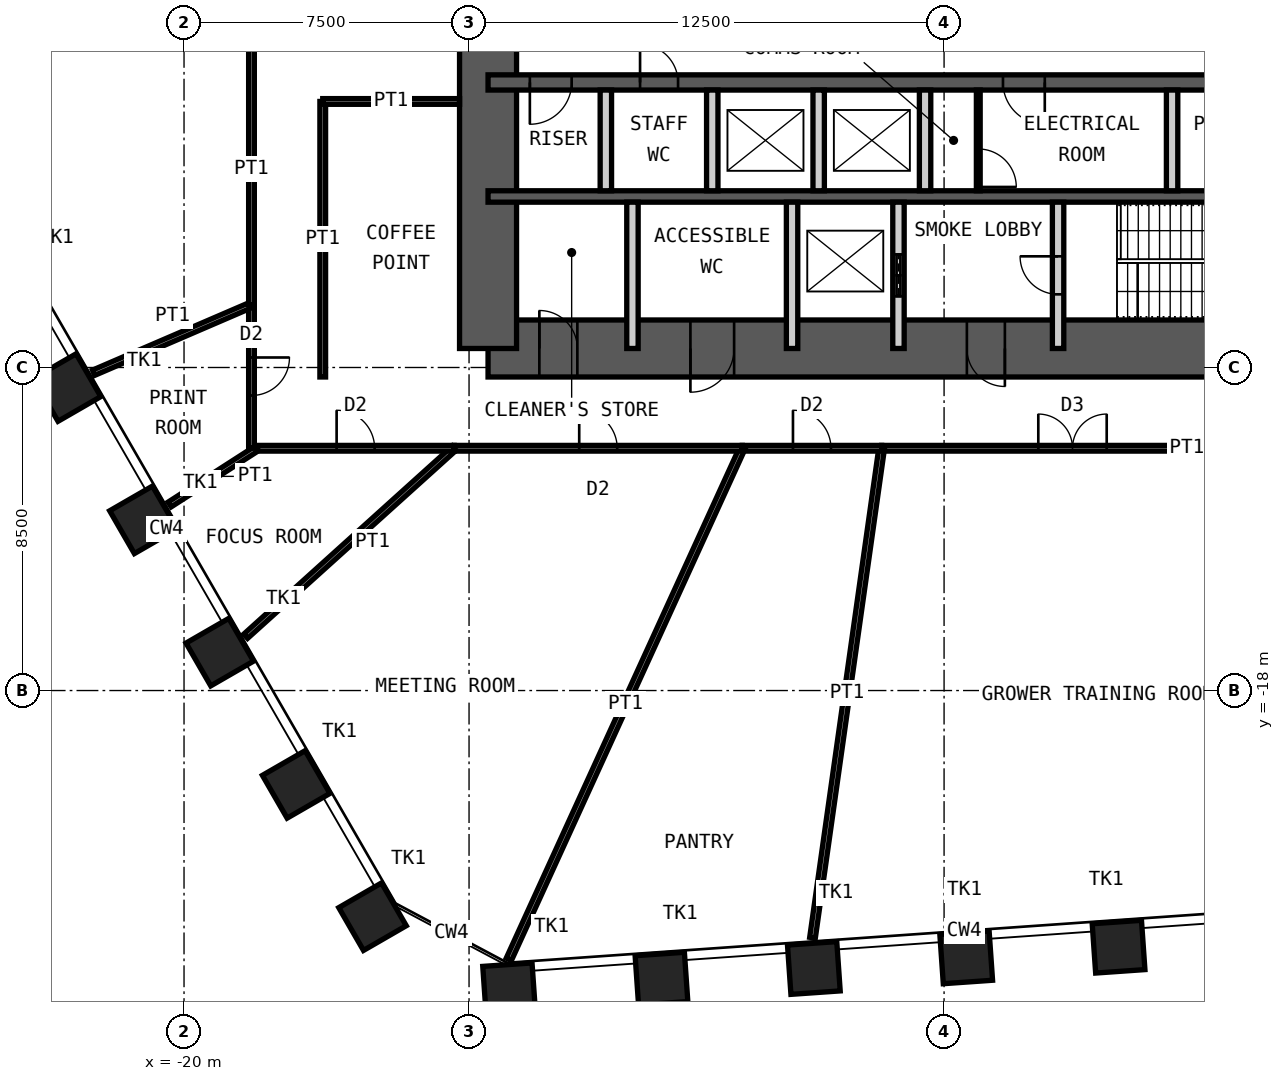
"""IFC4 building model, lengths in metres.
Left out: names, types, materials, properties, quantities, classifications, styles, units other than length and angle.
Written with IfcOpenShell. Run it as: python <this file> out.ifc"""

import sys

from ifc_helpers import new_model, si_unit, direction, frame, frame_2d, origin, origin_2d, place, context, subcontext, project, spatial, rectangle, hollow_rectangle, extrude, element, fill, save


model = new_model("IFC4")
c1 = context("Model", 3, precision=1e-05, world=origin(), true_north=direction((0.0, 1.0)))
c2 = subcontext(c1, "Body", "Model", "MODEL_VIEW")
j1 = project(units=[si_unit("LENGTHUNIT", "METRE"), si_unit("PLANEANGLEUNIT", "RADIAN")], contexts=[c1])
p1 = place(None, origin())
s1 = spatial("IfcSite", under=j1, at=p1, CompositionType="ELEMENT")
p2 = place(p1, origin())
s2 = spatial("IfcBuilding", under=s1, at=p2, CompositionType="ELEMENT")
p3 = place(p2, frame((0.0, 0.0, 170.2)))
s3 = spatial("IfcBuildingStorey", under=s2, at=p3, CompositionType="ELEMENT", Elevation=170.2)
for number, where, z_axis, x_axis in (
    (1, (4.592, -24.74, 0.0), (0.0, 0.0, 1.0), (0.998, 0.07, 0.0)),
    (2, (0.582, -25.02, 0.0), (0.0, 0.0, 1.0), (0.998, 0.07, 0.0)),
    (3, (-3.427, -25.301, 0.0), (0.0, 0.0, 1.0), (0.998, 0.07, 0.0)),
    (4, (-7.436, -25.581, 0.0), (0.0, 0.0, 1.0), (0.998, 0.07, 0.0)),
    (5, (-11.446, -25.861, 0.0), (0.0, 0.0, 1.0), (0.998, 0.07, 0.0)),
    (6, (-15.04, -23.95, 0.0), (0.0, 0.0, 1.0), (0.5, -0.866, 0.0)),
    (7, (-17.049, -20.47, 0.0), (0.0, 0.0, 1.0), (0.5, -0.866, 0.0)),
    (8, (-19.059, -16.989, 0.0), (0.0, 0.0, 1.0), (0.5, -0.866, 0.0)),
    (9, (-21.068, -13.509, 0.0), (0.0, 0.0, 1.0), (0.5, -0.866, 0.0)),
    (10, (-23.078, -10.028, 0.0), (0.0, 0.0, 1.0), (0.5, -0.866, 0.0)),
):
    element("IfcColumn", number, at=place(p3, frame(where, z_axis=z_axis, x_axis=x_axis)), inside=s3, PredefinedType="COLUMN", context=c2, shape_type="SweptSolid", body=[
        extrude(hollow_rectangle(XDim=1.3, YDim=1.3, WallThickness=0.1, at=origin_2d()), origin(), (0.0, 0.0, 1.0), 4.2),
    ])
p4 = place(p3, frame((-12.0, -9.0, 0.0), z_axis=(0.0, 0.0, 1.0), x_axis=(1.0, 0.0, 0.0)))
e11 = element("IfcWall", 11, at=p4, inside=s3, PredefinedType="SHEAR", context=c2, shape_type="SweptSolid", body=[
    extrude(rectangle(XDim=24.0, YDim=1.5, at=frame_2d((12.0, 0.0))), origin(), (0.0, 0.0, 1.0), 4.2),
])
p5 = place(p4, frame((1.35, 0.0, 0.0)))
e12 = element("IfcOpeningElement", 12, at=p5, cuts=e11, PredefinedType="OPENING", context=c2, shape_type="SweptSolid", body=[
    extrude(rectangle(XDim=1.0, YDim=2.1, at=frame_2d((0.5, 1.05))), frame((0.0, 0.76, 0.0), z_axis=(0.0, -1.0, 0.0), x_axis=(1.0, 0.0, 0.0)), (0.0, 0.0, 1.0), 1.52),
])
p6 = place(p4, frame((5.325, 0.0, 0.0)))
e13 = element("IfcOpeningElement", 13, at=p6, cuts=e11, PredefinedType="OPENING", context=c2, shape_type="SweptSolid", body=[
    extrude(rectangle(XDim=1.15, YDim=2.1, at=frame_2d((0.575, 1.05))), frame((0.0, 0.76, 0.0), z_axis=(0.0, -1.0, 0.0), x_axis=(1.0, 0.0, 0.0)), (0.0, 0.0, 1.0), 1.52),
])
p7 = place(p4, frame((12.6, 0.0, 0.0)))
e14 = element("IfcOpeningElement", 14, at=p7, cuts=e11, PredefinedType="OPENING", context=c2, shape_type="SweptSolid", body=[
    extrude(rectangle(XDim=1.0, YDim=2.1, at=frame_2d((0.5, 1.05))), frame((0.0, 0.76, 0.0), z_axis=(0.0, -1.0, 0.0), x_axis=(1.0, 0.0, 0.0)), (0.0, 0.0, 1.0), 1.52),
])
p8 = place(p3, frame((-12.0, -9.0, 0.0), z_axis=(0.0, 0.0, 1.0), x_axis=(0.0, 1.0, 0.0)))
e15 = element("IfcWall", 15, at=p8, inside=s3, PredefinedType="SHEAR", context=c2, shape_type="SweptSolid", body=[
    extrude(rectangle(XDim=18.0, YDim=1.5, at=frame_2d((9.0, 0.0))), origin(), (0.0, 0.0, 1.0), 4.2),
])
p9 = place(p8, frame((8.1, 0.0, 0.0)))
e16 = element("IfcOpeningElement", 16, at=p9, cuts=e15, PredefinedType="OPENING", context=c2, shape_type="SweptSolid", body=[
    extrude(rectangle(XDim=1.8, YDim=2.1, at=frame_2d((0.9, 1.05))), frame((0.0, 0.76, 0.0), z_axis=(0.0, -1.0, 0.0), x_axis=(1.0, 0.0, 0.0)), (0.0, 0.0, 1.0), 1.52),
])
p10 = place(p3, frame((-12.0, -2.0, 0.0), z_axis=(0.0, 0.0, 1.0), x_axis=(1.0, 0.0, 0.0)))
e17 = element("IfcWall", 17, at=p10, inside=s3, PredefinedType="SHEAR", context=c2, shape_type="SweptSolid", body=[
    extrude(rectangle(XDim=24.0, YDim=0.4, at=frame_2d((12.0, 0.0))), origin(), (0.0, 0.0, 1.0), 4.2),
])
p11 = place(p10, frame((1.1, 0.0, 0.0)))
e18 = element("IfcOpeningElement", 18, at=p11, cuts=e17, PredefinedType="OPENING", context=c2, shape_type="SweptSolid", body=[
    extrude(rectangle(XDim=1.1, YDim=2.1, at=frame_2d((0.55, 1.05))), frame((0.0, 0.21, 0.0), z_axis=(0.0, -1.0, 0.0), x_axis=(1.0, 0.0, 0.0)), (0.0, 0.0, 1.0), 0.42),
])
p12 = place(p10, frame((13.55, 0.0, 0.0)))
e19 = element("IfcOpeningElement", 19, at=p12, cuts=e17, PredefinedType="OPENING", context=c2, shape_type="SweptSolid", body=[
    extrude(rectangle(XDim=1.1, YDim=2.1, at=frame_2d((0.55, 1.05))), frame((0.0, 0.21, 0.0), z_axis=(0.0, -1.0, 0.0), x_axis=(1.0, 0.0, 0.0)), (0.0, 0.0, 1.0), 0.42),
])
p13 = place(p10, frame((20.7, 0.0, 0.0)))
e20 = element("IfcOpeningElement", 20, at=p13, cuts=e17, PredefinedType="OPENING", context=c2, shape_type="SweptSolid", body=[
    extrude(rectangle(XDim=1.1, YDim=2.1, at=frame_2d((0.55, 1.05))), frame((0.0, 0.21, 0.0), z_axis=(0.0, -1.0, 0.0), x_axis=(1.0, 0.0, 0.0)), (0.0, 0.0, 1.0), 0.42),
])
p14 = place(p10, frame((4.0, 0.0, 0.0)))
e21 = element("IfcOpeningElement", 21, at=p14, cuts=e17, PredefinedType="OPENING", context=c2, shape_type="SweptSolid", body=[
    extrude(rectangle(XDim=1.0, YDim=2.1, at=frame_2d((0.5, 1.05))), frame((0.0, 0.21, 0.0), z_axis=(0.0, -1.0, 0.0), x_axis=(1.0, 0.0, 0.0)), (0.0, 0.0, 1.0), 0.42),
])
p15 = place(p3, frame((-12.0, -5.0, 0.0), z_axis=(0.0, 0.0, 1.0), x_axis=(1.0, 0.0, 0.0)))
e22 = element("IfcWall", 22, at=p15, inside=s3, PredefinedType="SHEAR", context=c2, shape_type="SweptSolid", body=[
    extrude(rectangle(XDim=24.0, YDim=0.3, at=frame_2d((12.0, 0.0))), origin(), (0.0, 0.0, 1.0), 4.2),
])
for number, where, z_axis, x_axis in (
    (23, (-8.9, -4.85, 0.0), (0.0, 0.0, 1.0), (0.0, 1.0, 0.0)),
    (24, (-6.1, -4.85, 0.0), (0.0, 0.0, 1.0), (0.0, 1.0, 0.0)),
    (25, (-3.3, -4.85, 0.0), (0.0, 0.0, 1.0), (0.0, 1.0, 0.0)),
    (26, (-0.5, -4.85, 0.0), (0.0, 0.0, 1.0), (0.0, 1.0, 0.0)),
    (27, (6.0, -4.85, 0.0), (0.0, 0.0, 1.0), (0.0, 1.0, 0.0)),
):
    element("IfcWall", number, at=place(p3, frame(where, z_axis=z_axis, x_axis=x_axis)), inside=s3, PredefinedType="PARTITIONING", context=c2, shape_type="SweptSolid", body=[
        extrude(rectangle(XDim=2.65, YDim=0.3, at=frame_2d((1.325, 0.0))), origin(), (0.0, 0.0, 1.0), 3.98),
    ])
for number, where, z_axis, x_axis in (
    (28, (-8.2, -9.0, 0.0), (0.0, 0.0, 1.0), (0.0, 1.0, 0.0)),
    (29, (-4.0, -9.0, 0.0), (0.0, 0.0, 1.0), (0.0, 1.0, 0.0)),
):
    element("IfcWall", number, at=place(p3, frame(where, z_axis=z_axis, x_axis=x_axis)), inside=s3, PredefinedType="PARTITIONING", context=c2, shape_type="SweptSolid", body=[
        extrude(rectangle(XDim=3.85, YDim=0.3, at=frame_2d((1.925, 0.0))), origin(), (0.0, 0.0, 1.0), 3.98),
    ])
p16 = place(p3, frame((-1.2, -9.0, 0.0), z_axis=(0.0, 0.0, 1.0), x_axis=(0.0, 1.0, 0.0)))
e30 = element("IfcWall", 30, at=p16, inside=s3, PredefinedType="PARTITIONING", context=c2, shape_type="SweptSolid", body=[
    extrude(rectangle(XDim=3.85, YDim=0.3, at=frame_2d((1.925, 0.0))), origin(), (0.0, 0.0, 1.0), 3.98),
])
p17 = place(p16, frame((1.375, 0.0, 0.0)))
e31 = element("IfcOpeningElement", 31, at=p17, cuts=e30, PredefinedType="OPENING", context=c2, shape_type="SweptSolid", body=[
    extrude(rectangle(XDim=1.1, YDim=2.4, at=frame_2d((0.55, 1.2))), frame((0.0, 0.16, 0.0), z_axis=(0.0, -1.0, 0.0), x_axis=(1.0, 0.0, 0.0)), (0.0, 0.0, 1.0), 0.32),
])
p18 = place(p3, frame((3.0, -9.0, 0.0), z_axis=(0.0, 0.0, 1.0), x_axis=(0.0, 1.0, 0.0)))
e32 = element("IfcWall", 32, at=p18, inside=s3, PredefinedType="PARTITIONING", context=c2, shape_type="SweptSolid", body=[
    extrude(rectangle(XDim=3.85, YDim=0.3, at=frame_2d((1.925, 0.0))), origin(), (0.0, 0.0, 1.0), 3.98),
])
p19 = place(p18, frame((1.425, 0.0, 0.0)))
e33 = element("IfcOpeningElement", 33, at=p19, cuts=e32, PredefinedType="OPENING", context=c2, shape_type="SweptSolid", body=[
    extrude(rectangle(XDim=1.0, YDim=2.1, at=frame_2d((0.5, 1.05))), frame((0.0, 0.16, 0.0), z_axis=(0.0, -1.0, 0.0), x_axis=(1.0, 0.0, 0.0)), (0.0, 0.0, 1.0), 0.32),
])
p20 = place(p3, frame((0.9, -4.85, 0.0), z_axis=(0.0, 0.0, 1.0), x_axis=(0.0, 1.0, 0.0)))
e34 = element("IfcWall", 34, at=p20, inside=s3, PredefinedType="PARTITIONING", context=c2, shape_type="SweptSolid", body=[
    extrude(rectangle(XDim=2.65, YDim=0.1, at=frame_2d((1.325, 0.0))), origin(), (0.0, 0.0, 1.0), 3.98),
])
p21 = place(p20, frame((0.1, 0.0, 0.0)))
e35 = element("IfcOpeningElement", 35, at=p21, cuts=e34, PredefinedType="OPENING", context=c2, shape_type="SweptSolid", body=[
    extrude(rectangle(XDim=1.0, YDim=2.4, at=frame_2d((0.5, 1.2))), frame((0.0, 0.06, 0.0), z_axis=(0.0, -1.0, 0.0), x_axis=(1.0, 0.0, 0.0)), (0.0, 0.0, 1.0), 0.12),
])
p22 = place(p3, frame((8.401, -11.625, 0.0), z_axis=(0.0, 0.0, 1.0), x_axis=(-1.0, 0.0, 0.0)))
e36 = element("IfcWall", 36, at=p22, inside=s3, PredefinedType="PARTITIONING", context=c2, shape_type="SweptSolid", body=[
    extrude(rectangle(XDim=10.044, YDim=0.15, at=frame_2d((5.022, 0.0))), origin(), (0.0, 0.0, 1.0), 3.92),
])
p23 = place(p22, frame((4.122, 0.0, 0.0)))
e37 = element("IfcOpeningElement", 37, at=p23, cuts=e36, PredefinedType="OPENING", context=c2, shape_type="SweptSolid", body=[
    extrude(rectangle(XDim=1.8, YDim=2.4, at=frame_2d((0.9, 1.2))), frame((0.0, 0.085, 0.0), z_axis=(0.0, -1.0, 0.0), x_axis=(1.0, 0.0, 0.0)), (0.0, 0.0, 1.0), 0.17),
])
p24 = place(p3, frame((-3.462, -24.503, 0.0), z_axis=(0.0, 0.0, 1.0), x_axis=(0.139899618934, 0.990165691499, 0.0)))
e38 = element("IfcWall", 38, at=p24, inside=s3, PredefinedType="PARTITIONING", context=c2, shape_type="SweptSolid", body=[
    extrude(rectangle(XDim=13.006, YDim=0.15, at=frame_2d((6.503, 0.0))), origin(), (0.0, 0.0, 1.0), 2.72),
])
p25 = place(p3, frame((-1.642, -11.625, 0.0), z_axis=(0.0, 0.0, 1.0), x_axis=(-1.0, 0.0, 0.0)))
e39 = element("IfcWall", 39, at=p25, inside=s3, PredefinedType="PARTITIONING", context=c2, shape_type="SweptSolid", body=[
    extrude(rectangle(XDim=3.668, YDim=0.15, at=frame_2d((1.834, 0.0))), origin(), (0.0, 0.0, 1.0), 3.92),
])
p26 = place(p25, frame((1.334, 0.0, 0.0)))
e40 = element("IfcOpeningElement", 40, at=p26, cuts=e39, PredefinedType="OPENING", context=c2, shape_type="SweptSolid", body=[
    extrude(rectangle(XDim=1.0, YDim=2.4, at=frame_2d((0.5, 1.2))), frame((0.0, 0.085, 0.0), z_axis=(0.0, -1.0, 0.0), x_axis=(1.0, 0.0, 0.0)), (0.0, 0.0, 1.0), 0.17),
])
p27 = place(p3, frame((-11.453, -25.072, 0.0), z_axis=(0.0, 0.0, 1.0), x_axis=(0.415494357555, 0.909595755729, 0.0)))
e41 = element("IfcWall", 41, at=p27, inside=s3, PredefinedType="PARTITIONING", context=c2, shape_type="SweptSolid", body=[
    extrude(rectangle(XDim=14.784, YDim=0.15, at=frame_2d((7.392, 0.0))), origin(), (0.0, 0.0, 1.0), 2.72),
])
p28 = place(p3, frame((-5.31, -11.625, 0.0), z_axis=(0.0, 0.0, 1.0), x_axis=(-1.0, 0.0, 0.0)))
e42 = element("IfcWall", 42, at=p28, inside=s3, PredefinedType="PARTITIONING", context=c2, shape_type="SweptSolid", body=[
    extrude(rectangle(XDim=7.582, YDim=0.15, at=frame_2d((3.791, 0.0))), origin(), (0.0, 0.0, 1.0), 3.92),
])
p29 = place(p28, frame((3.291, 0.0, 0.0)))
e43 = element("IfcOpeningElement", 43, at=p29, cuts=e42, PredefinedType="OPENING", context=c2, shape_type="SweptSolid", body=[
    extrude(rectangle(XDim=1.0, YDim=2.4, at=frame_2d((0.5, 1.2))), frame((0.0, 0.085, 0.0), z_axis=(0.0, -1.0, 0.0), x_axis=(1.0, 0.0, 0.0)), (0.0, 0.0, 1.0), 0.17),
])
p30 = place(p3, frame((-18.378, -16.572, 0.0), z_axis=(0.0, 0.0, 1.0), x_axis=(0.742666079924, 0.669661924951, 0.0)))
e44 = element("IfcWall", 44, at=p30, inside=s3, PredefinedType="PARTITIONING", context=c2, shape_type="SweptSolid", body=[
    extrude(rectangle(XDim=7.387, YDim=0.15, at=frame_2d((3.694, 0.0))), origin(), (0.0, 0.0, 1.0), 2.72),
])
p31 = place(p3, frame((-12.892, -11.625, 0.0), z_axis=(0.0, 0.0, 1.0), x_axis=(-1.0, 0.0, 0.0)))
e45 = element("IfcWall", 45, at=p31, inside=s3, PredefinedType="PARTITIONING", context=c2, shape_type="SweptSolid", body=[
    extrude(rectangle(XDim=5.185, YDim=0.15, at=frame_2d((2.593, 0.0))), origin(), (0.0, 0.0, 1.0), 3.92),
])
p32 = place(p31, frame((2.093, 0.0, 0.0)))
e46 = element("IfcOpeningElement", 46, at=p32, cuts=e45, PredefinedType="OPENING", context=c2, shape_type="SweptSolid", body=[
    extrude(rectangle(XDim=1.0, YDim=2.4, at=frame_2d((0.5, 1.2))), frame((0.0, 0.085, 0.0), z_axis=(0.0, -1.0, 0.0), x_axis=(1.0, 0.0, 0.0)), (0.0, 0.0, 1.0), 0.17),
])
p33 = place(p3, frame((-20.378, -13.104, 0.0), z_axis=(0.0, 0.0, 1.0), x_axis=(0.841108871346, 0.540865848934, 0.0)))
e47 = element("IfcWall", 47, at=p33, inside=s3, PredefinedType="PARTITIONING", context=c2, shape_type="SweptSolid", body=[
    extrude(rectangle(XDim=2.735, YDim=0.15, at=frame_2d((1.368, 0.0))), origin(), (0.0, 0.0, 1.0), 2.72),
])
p34 = place(p3, frame((-18.225, -11.625, 0.0), z_axis=(0.0, 0.0, 1.0), x_axis=(0.0, 1.0, 0.0)))
e48 = element("IfcWall", 48, at=p34, inside=s3, PredefinedType="PARTITIONING", context=c2, shape_type="SweptSolid", body=[
    extrude(rectangle(XDim=3.776, YDim=0.15, at=frame_2d((1.888, 0.0))), origin(), (0.0, 0.0, 1.0), 3.92),
])
p35 = place(p34, frame((1.388, 0.0, 0.0)))
e49 = element("IfcOpeningElement", 49, at=p35, cuts=e48, PredefinedType="OPENING", context=c2, shape_type="SweptSolid", body=[
    extrude(rectangle(XDim=1.0, YDim=2.4, at=frame_2d((0.5, 1.2))), frame((0.0, 0.085, 0.0), z_axis=(0.0, -1.0, 0.0), x_axis=(1.0, 0.0, 0.0)), (0.0, 0.0, 1.0), 0.17),
])
p36 = place(p3, frame((-22.38, -9.638, 0.0), z_axis=(0.0, 0.0, 1.0), x_axis=(0.918428905659, 0.395586078181, 0.0)))
e50 = element("IfcWall", 50, at=p36, inside=s3, PredefinedType="PARTITIONING", context=c2, shape_type="SweptSolid", body=[
    extrude(rectangle(XDim=4.524, YDim=0.15, at=frame_2d((2.262, 0.0))), origin(), (0.0, 0.0, 1.0), 2.72),
])
p37 = place(p3, frame((-18.225, -7.849, 0.0), z_axis=(0.0, 0.0, 1.0), x_axis=(0.0, 1.0, 0.0)))
e51 = element("IfcWall", 51, at=p37, inside=s3, PredefinedType="PARTITIONING", context=c2, shape_type="SweptSolid", body=[
    extrude(rectangle(XDim=17.845, YDim=0.15, at=frame_2d((8.922, 0.0))), origin(), (0.0, 0.0, 1.0), 3.92),
])
p38 = place(p37, frame((8.022, 0.0, 0.0)))
e52 = element("IfcOpeningElement", 52, at=p38, cuts=e51, PredefinedType="OPENING", context=c2, shape_type="SweptSolid", body=[
    extrude(rectangle(XDim=1.8, YDim=2.4, at=frame_2d((0.9, 1.2))), frame((0.0, 0.085, 0.0), z_axis=(0.0, -1.0, 0.0), x_axis=(1.0, 0.0, 0.0)), (0.0, 0.0, 1.0), 0.17),
])
p39 = place(p3, frame((-16.35, -9.75, 0.0), z_axis=(0.0, 0.0, 1.0), x_axis=(0.0, 1.0, 0.0)))
e53 = element("IfcWall", 53, at=p39, inside=s3, PredefinedType="PARTITIONING", context=c2, shape_type="SweptSolid", body=[
    extrude(rectangle(XDim=7.25, YDim=0.15, at=frame_2d((3.625, 0.0))), origin(), (0.0, 0.0, 1.0), 3.92),
])
p40 = place(p3, frame((-12.75, -2.5, 0.0), z_axis=(0.0, 0.0, 1.0), x_axis=(-1.0, 0.0, 0.0)))
e54 = element("IfcWall", 54, at=p40, inside=s3, PredefinedType="PARTITIONING", context=c2, shape_type="SweptSolid", body=[
    extrude(rectangle(XDim=3.6, YDim=0.15, at=frame_2d((1.8, 0.0))), origin(), (0.0, 0.0, 1.0), 3.12),
])
p41 = place(p5, origin())
e55 = element("IfcDoor", 55, at=p41, inside=s3, OperationType="SINGLE_SWING_RIGHT", PredefinedType="DOOR", context=c2, shape_type="SweptSolid", body=[
    extrude(rectangle(XDim=1.0, YDim=2.1, at=frame_2d((0.5, 1.05))), frame((0.0, 0.025, 0.0), z_axis=(0.0, -1.0, 0.0), x_axis=(1.0, 0.0, 0.0)), (0.0, 0.0, 1.0), 0.05),
])
fill(e12, e55)
p42 = place(p6, origin())
e56 = element("IfcDoor", 56, at=p42, inside=s3, OperationType="SINGLE_SWING_LEFT", PredefinedType="DOOR", context=c2, shape_type="SweptSolid", body=[
    extrude(rectangle(XDim=1.15, YDim=2.1, at=frame_2d((0.575, 1.05))), frame((0.0, 0.025, 0.0), z_axis=(0.0, -1.0, 0.0), x_axis=(1.0, 0.0, 0.0)), (0.0, 0.0, 1.0), 0.05),
])
fill(e13, e56)
p43 = place(p7, origin())
e57 = element("IfcDoor", 57, at=p43, inside=s3, OperationType="SINGLE_SWING_RIGHT", PredefinedType="DOOR", context=c2, shape_type="SweptSolid", body=[
    extrude(rectangle(XDim=1.0, YDim=2.1, at=frame_2d((0.5, 1.05))), frame((0.0, 0.025, 0.0), z_axis=(0.0, -1.0, 0.0), x_axis=(1.0, 0.0, 0.0)), (0.0, 0.0, 1.0), 0.05),
])
fill(e14, e57)
p44 = place(p19, origin())
e58 = element("IfcDoor", 58, at=p44, inside=s3, OperationType="SINGLE_SWING_LEFT", PredefinedType="DOOR", context=c2, shape_type="SweptSolid", body=[
    extrude(rectangle(XDim=1.0, YDim=2.1, at=frame_2d((0.5, 1.05))), frame((0.0, 0.025, 0.0), z_axis=(0.0, -1.0, 0.0), x_axis=(1.0, 0.0, 0.0)), (0.0, 0.0, 1.0), 0.05),
])
fill(e33, e58)
p45 = place(p11, origin())
e59 = element("IfcDoor", 59, at=p45, inside=s3, OperationType="SINGLE_SWING_LEFT", PredefinedType="DOOR", context=c2, shape_type="SweptSolid", body=[
    extrude(rectangle(XDim=1.1, YDim=2.1, at=frame_2d((0.55, 1.05))), frame((0.0, 0.025, 0.0), z_axis=(0.0, -1.0, 0.0), x_axis=(1.0, 0.0, 0.0)), (0.0, 0.0, 1.0), 0.05),
])
fill(e18, e59)
p46 = place(p12, origin())
e60 = element("IfcDoor", 60, at=p46, inside=s3, OperationType="SINGLE_SWING_RIGHT", PredefinedType="DOOR", context=c2, shape_type="SweptSolid", body=[
    extrude(rectangle(XDim=1.1, YDim=2.1, at=frame_2d((0.55, 1.05))), frame((0.0, 0.025, 0.0), z_axis=(0.0, -1.0, 0.0), x_axis=(1.0, 0.0, 0.0)), (0.0, 0.0, 1.0), 0.05),
])
fill(e19, e60)
p47 = place(p17, origin())
e61 = element("IfcDoor", 61, at=p47, inside=s3, OperationType="DOUBLE_DOOR_SLIDING", PredefinedType="DOOR", context=c2, shape_type="SweptSolid", body=[
    extrude(rectangle(XDim=1.1, YDim=2.4, at=frame_2d((0.55, 1.2))), frame((0.0, 0.025, 0.0), z_axis=(0.0, -1.0, 0.0), x_axis=(1.0, 0.0, 0.0)), (0.0, 0.0, 1.0), 0.05),
])
fill(e31, e61)
p48 = place(p14, origin())
e62 = element("IfcDoor", 62, at=p48, inside=s3, OperationType="SINGLE_SWING_RIGHT", PredefinedType="DOOR", context=c2, shape_type="SweptSolid", body=[
    extrude(rectangle(XDim=1.0, YDim=2.1, at=frame_2d((0.5, 1.05))), frame((0.0, 0.025, 0.0), z_axis=(0.0, -1.0, 0.0), x_axis=(1.0, 0.0, 0.0)), (0.0, 0.0, 1.0), 0.05),
])
fill(e21, e62)
p49 = place(p21, origin())
e63 = element("IfcDoor", 63, at=p49, inside=s3, OperationType="SINGLE_SWING_LEFT", PredefinedType="DOOR", context=c2, shape_type="SweptSolid", body=[
    extrude(rectangle(XDim=1.0, YDim=2.4, at=frame_2d((0.5, 1.2))), frame((0.0, 0.025, 0.0), z_axis=(0.0, -1.0, 0.0), x_axis=(1.0, 0.0, 0.0)), (0.0, 0.0, 1.0), 0.05),
])
fill(e35, e63)
p50 = place(p23, origin())
e64 = element("IfcDoor", 64, at=p50, inside=s3, OperationType="DOUBLE_DOOR_DOUBLE_SWING", PredefinedType="DOOR", context=c2, shape_type="SweptSolid", body=[
    extrude(rectangle(XDim=1.8, YDim=2.4, at=frame_2d((0.9, 1.2))), frame((0.0, 0.025, 0.0), z_axis=(0.0, -1.0, 0.0), x_axis=(1.0, 0.0, 0.0)), (0.0, 0.0, 1.0), 0.05),
])
fill(e37, e64)
p51 = place(p26, origin())
e65 = element("IfcDoor", 65, at=p51, inside=s3, OperationType="SINGLE_SWING_RIGHT", PredefinedType="DOOR", context=c2, shape_type="SweptSolid", body=[
    extrude(rectangle(XDim=1.0, YDim=2.4, at=frame_2d((0.5, 1.2))), frame((0.0, 0.025, 0.0), z_axis=(0.0, -1.0, 0.0), x_axis=(1.0, 0.0, 0.0)), (0.0, 0.0, 1.0), 0.05),
])
fill(e40, e65)
p52 = place(p29, origin())
e66 = element("IfcDoor", 66, at=p52, inside=s3, OperationType="SINGLE_SWING_RIGHT", PredefinedType="DOOR", context=c2, shape_type="SweptSolid", body=[
    extrude(rectangle(XDim=1.0, YDim=2.4, at=frame_2d((0.5, 1.2))), frame((0.0, 0.025, 0.0), z_axis=(0.0, -1.0, 0.0), x_axis=(1.0, 0.0, 0.0)), (0.0, 0.0, 1.0), 0.05),
])
fill(e43, e66)
p53 = place(p32, origin())
e67 = element("IfcDoor", 67, at=p53, inside=s3, OperationType="SINGLE_SWING_RIGHT", PredefinedType="DOOR", context=c2, shape_type="SweptSolid", body=[
    extrude(rectangle(XDim=1.0, YDim=2.4, at=frame_2d((0.5, 1.2))), frame((0.0, 0.025, 0.0), z_axis=(0.0, -1.0, 0.0), x_axis=(1.0, 0.0, 0.0)), (0.0, 0.0, 1.0), 0.05),
])
fill(e46, e67)
p54 = place(p35, origin())
e68 = element("IfcDoor", 68, at=p54, inside=s3, OperationType="SINGLE_SWING_RIGHT", PredefinedType="DOOR", context=c2, shape_type="SweptSolid", body=[
    extrude(rectangle(XDim=1.0, YDim=2.4, at=frame_2d((0.5, 1.2))), frame((0.0, 0.025, 0.0), z_axis=(0.0, -1.0, 0.0), x_axis=(1.0, 0.0, 0.0)), (0.0, 0.0, 1.0), 0.05),
])
fill(e49, e68)
save(model, sys.argv[1])
